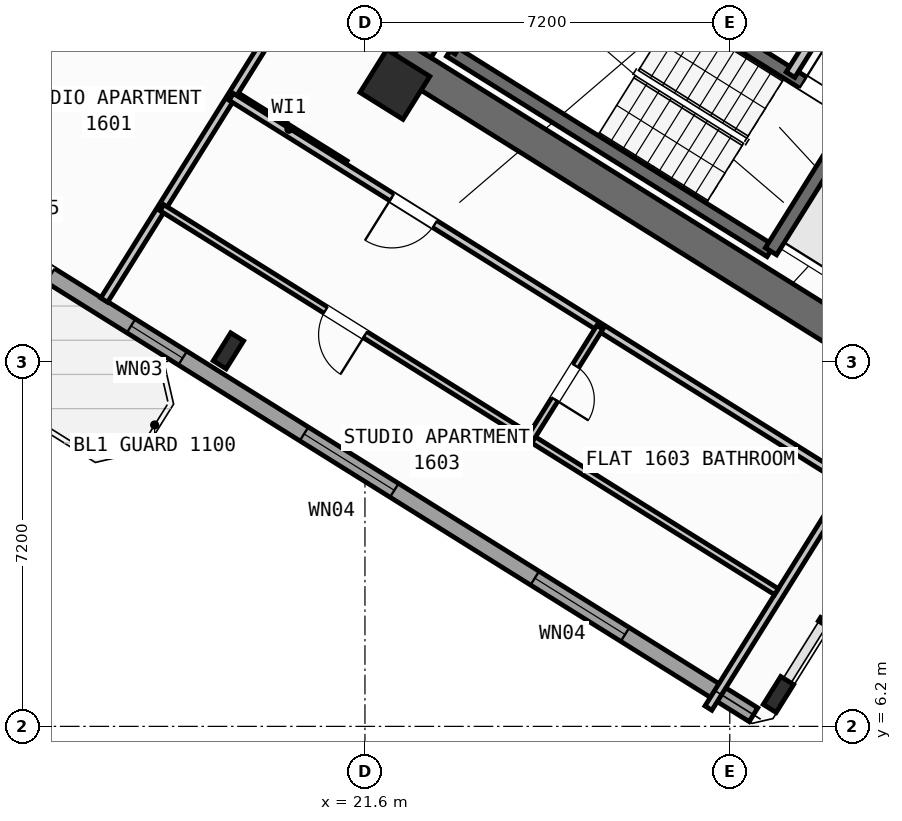
"""IFC4 building model, lengths in metres.
Left out: names, types, materials, properties, quantities, classifications, styles, units other than length and angle.
Written with IfcOpenShell. Run it as: python <this file> out.ifc"""

import sys

from ifc_helpers import new_model, si_unit, direction, frame, frame_2d, origin, origin_2d, place, context, subcontext, project, spatial, rectangle, hollow_rectangle, i_section, extrude, source, transform, mapped, element, fill, save


model = new_model("IFC4")
c1 = context("Model", 3, precision=1e-05, world=origin(), true_north=direction((0.0, 1.0)))
c2 = subcontext(c1, "Body", "Model", "MODEL_VIEW")
j1 = project(units=[si_unit("LENGTHUNIT", "METRE"), si_unit("PLANEANGLEUNIT", "RADIAN")], contexts=[c1])
p1 = place(None, origin())
s1 = spatial("IfcSite", under=j1, at=p1, CompositionType="ELEMENT")
p2 = place(p1, origin())
s2 = spatial("IfcBuilding", under=s1, at=p2, CompositionType="ELEMENT")
p3 = place(p2, frame((0.0, 0.0, 63.6)))
s3 = spatial("IfcBuildingStorey", under=s2, at=p3, CompositionType="ELEMENT", Elevation=63.6)
p4 = place(p3, frame((33.409, 12.45, 0.0), z_axis=(0.0, 0.0, 1.0), x_axis=(-0.848051132073, 0.529914405721, 0.0)))
e1 = element("IfcWall", 1, at=p4, inside=s3, PredefinedType="SHEAR", context=c2, shape_type="SweptSolid", body=[
    extrude(rectangle(XDim=13.24, YDim=0.65, at=frame_2d((6.62, 0.0))), origin(), (0.0, 0.0, 1.0), 3.35),
])
p5 = place(p3, frame((26.007, 24.976, 0.0), z_axis=(0.0, 0.0, 1.0), x_axis=(-0.529916319127, -0.848049936456, 0.0)))
e2 = element("IfcWall", 2, at=p5, inside=s3, PredefinedType="SHEAR", context=c2, shape_type="SweptSolid", body=[
    extrude(rectangle(XDim=6.375, YDim=0.65, at=frame_2d((3.188, 0.0))), origin(), (0.0, 0.0, 1.0), 3.35),
])
m1 = source(origin(), c2, "Body", "SweptSolid", [
    extrude(i_section(OverallWidth=0.3, OverallDepth=0.65, WebThickness=0.016, FlangeThickness=0.031, at=origin_2d()), origin(), (0.0, 0.0, 1.0), 3.6),
])
p6 = place(p3, frame((29.761, 6.829, 0.0), z_axis=(0.0, 0.0, 1.0), x_axis=(-0.848048096156, 0.529919264233, 0.0)))
e3 = element("IfcColumn", 3, at=p6, inside=s3, PredefinedType="COLUMN", context=c2, shape_type="MappedRepresentation", body=[
    mapped(m1, transform((0.0, 0.0, 0.0), scale=1.0)),
])
m2 = source(origin(), c2, "Body", "SweptSolid", [
    extrude(hollow_rectangle(XDim=1.0, YDim=1.0, WallThickness=0.04, at=origin_2d()), origin(), (0.0, 0.0, 1.0), 3.6),
])
p7 = place(p3, frame((22.191, 18.87, 0.0), z_axis=(0.0, 0.0, 1.0), x_axis=(-0.848048096156, 0.529919264233, 0.0)))
e4 = element("IfcColumn", 4, at=p7, inside=s3, PredefinedType="COLUMN", context=c2, shape_type="MappedRepresentation", body=[
    mapped(m2, transform((0.0, 0.0, 0.0), scale=1.0)),
])
p8 = place(p3, frame((18.906, 13.612, 0.0), z_axis=(0.0, 0.0, 1.0), x_axis=(-0.848048096156, 0.529919264233, 0.0)))
e5 = element("IfcColumn", 5, at=p8, inside=s3, PredefinedType="COLUMN", context=c2, shape_type="MappedRepresentation", body=[
    mapped(m1, transform((0.0, 0.0, 0.0), scale=1.0)),
])
p9 = place(p3, frame((29.268, 6.429, 0.0), z_axis=(0.0, 0.0, 1.0), x_axis=(-0.848049971435, 0.529916263149, 0.0)))
e6 = element("IfcWall", 6, at=p9, inside=s3, PredefinedType="STANDARD", context=c2, shape_type="SweptSolid", body=[
    extrude(rectangle(XDim=31.588, YDim=0.32, at=frame_2d((15.794, 0.0))), origin(), (0.0, 0.0, 1.0), 3.35),
])
p10 = place(p9, frame((16.362, 0.0, 0.0)))
e7 = element("IfcOpeningElement", 7, at=p10, cuts=e6, PredefinedType="OPENING", context=c2, shape_type="SweptSolid", body=[
    extrude(rectangle(XDim=1.2, YDim=2.15, at=frame_2d((0.6, 1.075))), frame((0.0, 0.17, 0.0), z_axis=(0.0, -1.0, 0.0), x_axis=(1.0, 0.0, 0.0)), (0.0, 0.0, 1.0), 0.34),
])
p11 = place(p9, frame((2.989, 0.0, 0.8)))
e8 = element("IfcOpeningElement", 8, at=p11, cuts=e6, PredefinedType="OPENING", context=c2, shape_type="SweptSolid", body=[
    extrude(rectangle(XDim=2.1, YDim=1.55, at=frame_2d((1.05, 0.775))), frame((0.0, 0.17, 0.0), z_axis=(0.0, -1.0, 0.0), x_axis=(1.0, 0.0, 0.0)), (0.0, 0.0, 1.0), 0.34),
])
p12 = place(p9, frame((8.359, 0.0, 0.8)))
e9 = element("IfcOpeningElement", 9, at=p12, cuts=e6, PredefinedType="OPENING", context=c2, shape_type="SweptSolid", body=[
    extrude(rectangle(XDim=2.1, YDim=1.55, at=frame_2d((1.05, 0.775))), frame((0.0, 0.17, 0.0), z_axis=(0.0, -1.0, 0.0), x_axis=(1.0, 0.0, 0.0)), (0.0, 0.0, 1.0), 0.34),
])
p13 = place(p9, frame((13.284, 0.0, 0.95)))
e10 = element("IfcOpeningElement", 10, at=p13, cuts=e6, PredefinedType="OPENING", context=c2, shape_type="SweptSolid", body=[
    extrude(rectangle(XDim=1.2, YDim=1.4, at=frame_2d((0.6, 0.7))), frame((0.0, 0.17, 0.0), z_axis=(0.0, -1.0, 0.0), x_axis=(1.0, 0.0, 0.0)), (0.0, 0.0, 1.0), 0.34),
])
p14 = place(p9, frame((29.188, 0.0, 0.95)))
e11 = element("IfcOpeningElement", 11, at=p14, cuts=e6, PredefinedType="OPENING", context=c2, shape_type="SweptSolid", body=[
    extrude(rectangle(XDim=1.2, YDim=1.4, at=frame_2d((0.6, 0.7))), frame((0.0, 0.17, 0.0), z_axis=(0.0, -1.0, 0.0), x_axis=(1.0, 0.0, 0.0)), (0.0, 0.0, 1.0), 0.34),
])
p15 = place(p9, frame((19.11, 0.0, 1.0)))
e12 = element("IfcOpeningElement", 12, at=p15, cuts=e6, PredefinedType="OPENING", context=c2, shape_type="SweptSolid", body=[
    extrude(rectangle(XDim=0.9, YDim=1.25, at=frame_2d((0.45, 0.625))), frame((0.0, 0.17, 0.0), z_axis=(0.0, -1.0, 0.0), x_axis=(1.0, 0.0, 0.0)), (0.0, 0.0, 1.0), 0.34),
])
p16 = place(p9, frame((21.226, 0.0, 1.0)))
e13 = element("IfcOpeningElement", 13, at=p16, cuts=e6, PredefinedType="OPENING", context=c2, shape_type="SweptSolid", body=[
    extrude(rectangle(XDim=0.9, YDim=1.25, at=frame_2d((0.45, 0.625))), frame((0.0, 0.17, 0.0), z_axis=(0.0, -1.0, 0.0), x_axis=(1.0, 0.0, 0.0)), (0.0, 0.0, 1.0), 0.34),
])
p17 = place(p9, frame((23.014, 0.0, 1.0)))
e14 = element("IfcOpeningElement", 14, at=p17, cuts=e6, PredefinedType="OPENING", context=c2, shape_type="SweptSolid", body=[
    extrude(rectangle(XDim=0.9, YDim=1.25, at=frame_2d((0.45, 0.625))), frame((0.0, 0.17, 0.0), z_axis=(0.0, -1.0, 0.0), x_axis=(1.0, 0.0, 0.0)), (0.0, 0.0, 1.0), 0.34),
])
p18 = place(p9, frame((24.802, 0.0, 1.0)))
e15 = element("IfcOpeningElement", 15, at=p18, cuts=e6, PredefinedType="OPENING", context=c2, shape_type="SweptSolid", body=[
    extrude(rectangle(XDim=0.9, YDim=1.25, at=frame_2d((0.45, 0.625))), frame((0.0, 0.17, 0.0), z_axis=(0.0, -1.0, 0.0), x_axis=(1.0, 0.0, 0.0)), (0.0, 0.0, 1.0), 0.34),
])
p19 = place(p9, frame((26.59, 0.0, 1.0)))
e16 = element("IfcOpeningElement", 16, at=p19, cuts=e6, PredefinedType="OPENING", context=c2, shape_type="SweptSolid", body=[
    extrude(rectangle(XDim=0.9, YDim=1.25, at=frame_2d((0.45, 0.625))), frame((0.0, 0.17, 0.0), z_axis=(0.0, -1.0, 0.0), x_axis=(1.0, 0.0, 0.0)), (0.0, 0.0, 1.0), 0.34),
])
p20 = place(p3, frame((29.605, 15.581, 0.0), z_axis=(0.0, 0.0, 1.0), x_axis=(-0.848036911448, 0.529937163087, 0.0)))
e17 = element("IfcWall", 17, at=p20, inside=s3, PredefinedType="SHEAR", context=c2, shape_type="SweptSolid", body=[
    extrude(rectangle(XDim=7.46, YDim=0.26, at=frame_2d((3.73, 0.0))), origin(), (0.0, 0.0, 1.0), 3.35),
])
p21 = place(p3, frame((31.28, 18.261, 0.0), z_axis=(0.0, 0.0, 1.0), x_axis=(-0.848051618787, 0.529913626805, 0.0)))
e18 = element("IfcWall", 18, at=p21, inside=s3, PredefinedType="SHEAR", context=c2, shape_type="SweptSolid", body=[
    extrude(rectangle(XDim=7.46, YDim=0.26, at=frame_2d((3.73, 0.0))), origin(), (0.0, 0.0, 1.0), 3.35),
])
p22 = place(p21, frame((0.36, 0.0, 0.0)))
e19 = element("IfcOpeningElement", 19, at=p22, cuts=e18, PredefinedType="OPENING", context=c2, shape_type="SweptSolid", body=[
    extrude(rectangle(XDim=0.86, YDim=2.05, at=frame_2d((0.43, 1.025))), frame((0.0, 0.14, 0.0), z_axis=(0.0, -1.0, 0.0), x_axis=(1.0, 0.0, 0.0)), (0.0, 0.0, 1.0), 0.28),
])
p23 = place(p3, frame((31.288, 18.256, 0.0), z_axis=(0.0, 0.0, 1.0), x_axis=(-0.529943379326, -0.848033026897, 0.0)))
e20 = element("IfcWall", 20, at=p23, inside=s3, PredefinedType="SHEAR", context=c2, shape_type="SweptSolid", body=[
    extrude(rectangle(XDim=3.16, YDim=0.26, at=frame_2d((1.58, 0.0))), origin(), (0.0, 0.0, 1.0), 3.35),
])
p24 = place(p3, frame((24.945, 22.22, 0.0), z_axis=(0.0, 0.0, 1.0), x_axis=(-0.529908658664, -0.84805472316, 0.0)))
e21 = element("IfcWall", 21, at=p24, inside=s3, PredefinedType="SHEAR", context=c2, shape_type="SweptSolid", body=[
    extrude(rectangle(XDim=3.16, YDim=0.26, at=frame_2d((1.58, 0.0))), origin(), (0.0, 0.0, 1.0), 3.35),
])
p25 = place(p3, frame((31.525, 21.504, 0.0), z_axis=(0.0, 0.0, 1.0), x_axis=(-0.529907497854, -0.848055448493, 0.0)))
e22 = element("IfcWall", 22, at=p25, inside=s3, PredefinedType="STANDARD", context=c2, shape_type="SweptSolid", body=[
    extrude(rectangle(XDim=2.88, YDim=0.2, at=frame_2d((1.44, 0.0))), origin(), (0.0, 0.0, 1.0), 3.34),
])
p26 = place(p3, frame((21.206, 17.292, 0.0), z_axis=(0.0, 0.0, 1.0), x_axis=(-0.848050851465, 0.529914854792, 0.0)))
e23 = element("IfcWall", 23, at=p26, inside=s3, PredefinedType="PARTITIONING", context=c2, shape_type="SweptSolid", body=[
    extrude(rectangle(XDim=2.61, YDim=0.16, at=frame_2d((1.305, 0.0))), origin(), (0.0, 0.0, 1.0), 3.34),
])
p27 = place(p3, frame((23.899, 26.529, 0.0), z_axis=(0.0, 0.0, 1.0), x_axis=(-0.529917716469, -0.848049063305, 0.0)))
e24 = element("IfcWall", 24, at=p27, inside=s3, PredefinedType="PARTITIONING", context=c2, shape_type="SweptSolid", body=[
    extrude(rectangle(XDim=14.05, YDim=0.16, at=frame_2d((7.025, 0.0))), origin(), (0.0, 0.0, 1.0), 3.34),
])
p28 = place(p3, frame((16.492, 21.827, 0.0), z_axis=(0.0, 0.0, 1.0), x_axis=(-0.529904608059, -0.848057254175, 0.0)))
e25 = element("IfcWall", 25, at=p28, inside=s3, PredefinedType="PARTITIONING", context=c2, shape_type="SweptSolid", body=[
    extrude(rectangle(XDim=5.351, YDim=0.16, at=frame_2d((2.675, 0.0))), origin(), (0.0, 0.0, 1.0), 2.725),
])
p29 = place(p3, frame((16.848, 25.77, 0.0), z_axis=(0.0, 0.0, 1.0), x_axis=(-0.529910626741, -0.8480534934, 0.0)))
e26 = element("IfcWall", 26, at=p29, inside=s3, PredefinedType="PARTITIONING", context=c2, shape_type="SweptSolid", body=[
    extrude(rectangle(XDim=9.94, YDim=0.11, at=frame_2d((4.97, 0.0))), origin(), (0.0, 0.0, 1.0), 3.34),
])
p30 = place(p3, frame((32.164, 10.374, 0.0), z_axis=(0.0, 0.0, 1.0), x_axis=(-0.848044107957, 0.529925646633, 0.0)))
e27 = element("IfcWall", 27, at=p30, inside=s3, PredefinedType="PARTITIONING", context=c2, shape_type="SweptSolid", body=[
    extrude(rectangle(XDim=15.57, YDim=0.16, at=frame_2d((7.785, 0.0))), origin(), (0.0, 0.0, 1.0), 3.34),
])
p31 = place(p30, frame((10.83, 0.0, 0.0)))
e28 = element("IfcOpeningElement", 28, at=p31, cuts=e27, PredefinedType="OPENING", context=c2, shape_type="SweptSolid", body=[
    extrude(rectangle(XDim=1.0, YDim=2.1, at=frame_2d((0.5, 1.05))), frame((0.0, 0.09, 0.0), z_axis=(0.0, -1.0, 0.0), x_axis=(1.0, 0.0, 0.0)), (0.0, 0.0, 1.0), 0.18),
])
p32 = place(p3, frame((31.282, 11.208, 0.0), z_axis=(0.0, 0.0, 1.0), x_axis=(-0.529938869374, -0.84803584519, 0.0)))
e29 = element("IfcWall", 29, at=p32, inside=s3, PredefinedType="PARTITIONING", context=c2, shape_type="SweptSolid", body=[
    extrude(rectangle(XDim=5.48, YDim=0.16, at=frame_2d((2.74, 0.0))), origin(), (0.0, 0.0, 1.0), 3.34),
])
p33 = place(p3, frame((29.72, 8.859, 0.0), z_axis=(0.0, 0.0, 1.0), x_axis=(-0.848049134363, 0.529917602752, 0.0)))
e30 = element("IfcWall", 30, at=p33, inside=s3, PredefinedType="PLUMBINGWALL", context=c2, shape_type="SweptSolid", body=[
    extrude(rectangle(XDim=14.3, YDim=0.14, at=frame_2d((7.15, 0.0))), origin(), (0.0, 0.0, 1.0), 3.34),
])
p34 = place(p33, frame((9.57, 0.0, 0.0)))
e31 = element("IfcOpeningElement", 31, at=p34, cuts=e30, PredefinedType="OPENING", context=c2, shape_type="SweptSolid", body=[
    extrude(rectangle(XDim=0.92, YDim=2.08, at=frame_2d((0.46, 1.04))), frame((0.0, 0.08, 0.0), z_axis=(0.0, -1.0, 0.0), x_axis=(1.0, 0.0, 0.0)), (0.0, 0.0, 1.0), 0.16),
])
p35 = place(p3, frame((26.237, 14.078, 0.0), z_axis=(0.0, 0.0, 1.0), x_axis=(-0.52995640672, -0.848024885824, 0.0)))
e32 = element("IfcWall", 32, at=p35, inside=s3, PredefinedType="PLUMBINGWALL", context=c2, shape_type="SweptSolid", body=[
    extrude(rectangle(XDim=2.58, YDim=0.14, at=frame_2d((1.29, 0.0))), origin(), (0.0, 0.0, 1.0), 3.34),
])
p36 = place(p35, frame((0.9, 0.0, 0.0)))
e33 = element("IfcOpeningElement", 33, at=p36, cuts=e32, PredefinedType="OPENING", context=c2, shape_type="SweptSolid", body=[
    extrude(rectangle(XDim=0.78, YDim=2.05, at=frame_2d((0.39, 1.025))), frame((0.0, 0.08, 0.0), z_axis=(0.0, -1.0, 0.0), x_axis=(1.0, 0.0, 0.0)), (0.0, 0.0, 1.0), 0.16),
])
m3 = source(origin(), c2, "Body", "SweptSolid", [
    extrude(rectangle(XDim=2.1, YDim=1.55, at=frame_2d((1.05, 0.775))), frame((0.0, 0.03, 0.0), z_axis=(0.0, -1.0, 0.0), x_axis=(1.0, 0.0, 0.0)), (0.0, 0.0, 1.0), 0.06),
])
p37 = place(p11, origin())
e34 = element("IfcWindow", 34, at=p37, inside=s3, PartitioningType="SINGLE_PANEL", PredefinedType="WINDOW", context=c2, shape_type="MappedRepresentation", body=[
    mapped(m3, transform((0.0, 0.0, 0.0), scale=1.0)),
])
fill(e8, e34)
p38 = place(p12, origin())
e35 = element("IfcWindow", 35, at=p38, inside=s3, PartitioningType="SINGLE_PANEL", PredefinedType="WINDOW", context=c2, shape_type="MappedRepresentation", body=[
    mapped(m3, transform((0.0, 0.0, 0.0), scale=1.0)),
])
fill(e9, e35)
m4 = source(origin(), c2, "Body", "SweptSolid", [
    extrude(rectangle(XDim=1.2, YDim=1.4, at=frame_2d((0.6, 0.7))), frame((0.0, 0.03, 0.0), z_axis=(0.0, -1.0, 0.0), x_axis=(1.0, 0.0, 0.0)), (0.0, 0.0, 1.0), 0.06),
])
p39 = place(p13, origin())
e36 = element("IfcWindow", 36, at=p39, inside=s3, PartitioningType="SINGLE_PANEL", PredefinedType="WINDOW", context=c2, shape_type="MappedRepresentation", body=[
    mapped(m4, transform((0.0, 0.0, 0.0), scale=1.0)),
])
fill(e10, e36)
m5 = source(origin(), c2, "Body", "SweptSolid", [
    extrude(rectangle(XDim=0.86, YDim=2.05, at=frame_2d((0.43, 1.025))), frame((0.0, 0.025, 0.0), z_axis=(0.0, -1.0, 0.0), x_axis=(1.0, 0.0, 0.0)), (0.0, 0.0, 1.0), 0.05),
])
p40 = place(p22, frame((0.86, 0.0, 0.0), z_axis=(0.0, 0.0, 1.0), x_axis=(-1.0, 0.0, 0.0)))
e37 = element("IfcDoor", 37, at=p40, inside=s3, OperationType="SINGLE_SWING_LEFT", PredefinedType="DOOR", context=c2, shape_type="MappedRepresentation", body=[
    mapped(m5, transform((0.0, 0.0, 0.0), scale=1.0)),
])
fill(e19, e37)
m6 = source(origin(), c2, "Body", "SweptSolid", [
    extrude(rectangle(XDim=1.0, YDim=2.1, at=frame_2d((0.5, 1.05))), frame((0.0, 0.025, 0.0), z_axis=(0.0, -1.0, 0.0), x_axis=(1.0, 0.0, 0.0)), (0.0, 0.0, 1.0), 0.05),
])
p41 = place(p31, origin())
e38 = element("IfcDoor", 38, at=p41, inside=s3, OperationType="SINGLE_SWING_RIGHT", PredefinedType="DOOR", context=c2, shape_type="MappedRepresentation", body=[
    mapped(m6, transform((0.0, 0.0, 0.0), scale=1.0)),
])
fill(e28, e38)
m7 = source(origin(), c2, "Body", "SweptSolid", [
    extrude(rectangle(XDim=0.92, YDim=2.08, at=frame_2d((0.46, 1.04))), frame((0.0, 0.025, 0.0), z_axis=(0.0, -1.0, 0.0), x_axis=(1.0, 0.0, 0.0)), (0.0, 0.0, 1.0), 0.05),
])
p42 = place(p34, origin())
e39 = element("IfcDoor", 39, at=p42, inside=s3, OperationType="SINGLE_SWING_LEFT", PredefinedType="DOOR", context=c2, shape_type="MappedRepresentation", body=[
    mapped(m7, transform((0.0, 0.0, 0.0), scale=1.0)),
])
fill(e31, e39)
m8 = source(origin(), c2, "Body", "SweptSolid", [
    extrude(rectangle(XDim=0.78, YDim=2.05, at=frame_2d((0.39, 1.025))), frame((0.0, 0.025, 0.0), z_axis=(0.0, -1.0, 0.0), x_axis=(1.0, 0.0, 0.0)), (0.0, 0.0, 1.0), 0.05),
])
p43 = place(p36, origin())
e40 = element("IfcDoor", 40, at=p43, inside=s3, OperationType="SINGLE_SWING_RIGHT", PredefinedType="DOOR", context=c2, shape_type="MappedRepresentation", body=[
    mapped(m8, transform((0.0, 0.0, 0.0), scale=1.0)),
])
fill(e33, e40)
save(model, sys.argv[1])
